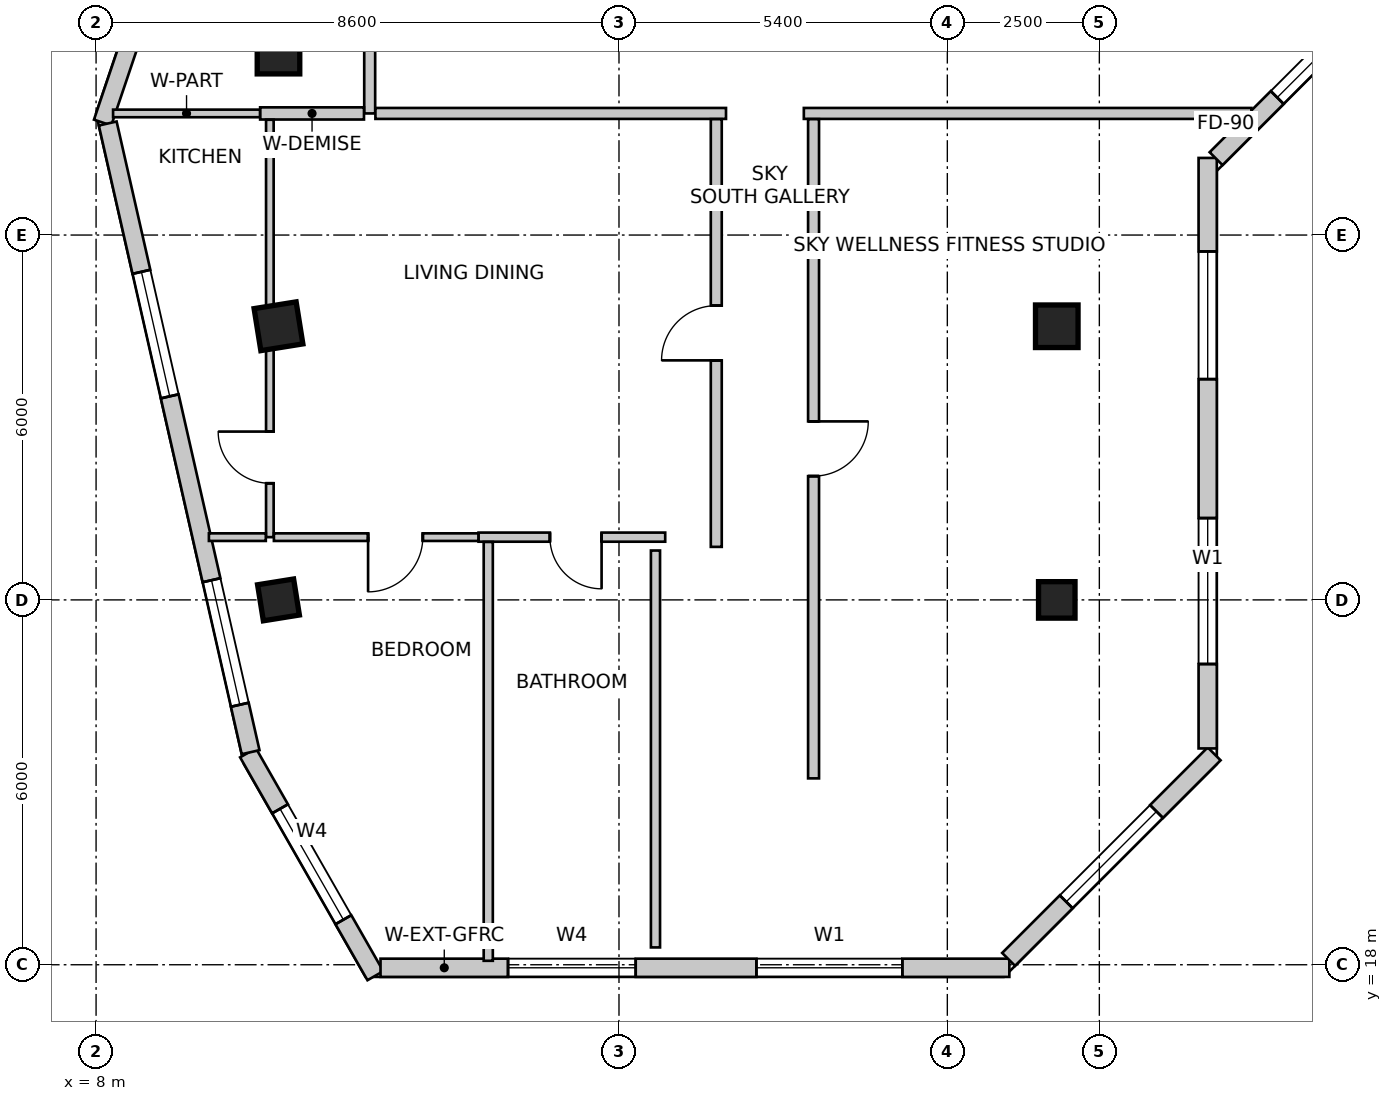
"""IFC4 building model, lengths in metres.
Left out: names, types, materials, properties, quantities, classifications, styles, units other than length and angle.
Written with IfcOpenShell. Run it as: python <this file> out.ifc"""

import sys

from ifc_helpers import new_model, si_unit, direction, frame, frame_2d, origin, origin_2d, place, context, subcontext, project, spatial, rectangle, extrude, source, transform, mapped, element, fill, save


model = new_model("IFC4")
c1 = context("Model", 3, precision=1e-05, world=origin(), true_north=direction((0.0, 1.0)))
c2 = subcontext(c1, "Body", "Model", "MODEL_VIEW")
j1 = project(units=[si_unit("LENGTHUNIT", "METRE"), si_unit("PLANEANGLEUNIT", "RADIAN")], contexts=[c1])
p1 = place(None, origin())
s1 = spatial("IfcSite", under=j1, at=p1, CompositionType="ELEMENT")
p2 = place(p1, origin())
s2 = spatial("IfcBuilding", under=s1, at=p2, CompositionType="ELEMENT")
p3 = place(p2, frame((0.0, 0.0, 260.1)))
s3 = spatial("IfcBuildingStorey", under=s2, at=p3, CompositionType="ELEMENT", Elevation=260.1)
m1 = source(origin(), c2, "Body", "SweptSolid", [
    extrude(rectangle(XDim=0.7, YDim=0.7, at=origin_2d()), origin(), (0.0, 0.0, 1.0), 3.6),
])
for number, where, z_axis, x_axis in (
    (1, (11.0, 33.0, 0.0), (0.0, 0.0, 1.0), (1.0, 0.0, 0.0)),
    (2, (11.0, 28.5, 0.0), (0.0, 0.0, 1.0), (0.158, -0.987, 0.0)),
):
    element("IfcColumn", number, at=place(p3, frame(where, z_axis=z_axis, x_axis=x_axis)), inside=s3, PredefinedType="COLUMN", context=c2, shape_type="MappedRepresentation", body=[
        mapped(m1, transform((0.0, 0.0, 0.0), scale=1.0)),
    ])
m2 = source(origin(), c2, "Body", "SweptSolid", [
    extrude(rectangle(XDim=0.6, YDim=0.6, at=origin_2d()), origin(), (0.0, 0.0, 1.0), 3.6),
])
p4 = place(p3, frame((11.0, 24.0, 0.0), z_axis=(0.0, 0.0, 1.0), x_axis=(0.158158067254, -0.987413806751, 0.0)))
e3 = element("IfcColumn", 3, at=p4, inside=s3, PredefinedType="COLUMN", context=c2, shape_type="MappedRepresentation", body=[
    mapped(m2, transform((0.0, 0.0, 0.0), scale=1.0)),
])
p5 = place(p3, frame((23.8, 28.5, 0.0), z_axis=(0.0, 0.0, 1.0), x_axis=(1.0, 0.0, 0.0)))
e4 = element("IfcColumn", 4, at=p5, inside=s3, PredefinedType="COLUMN", context=c2, shape_type="MappedRepresentation", body=[
    mapped(m1, transform((0.0, 0.0, 0.0), scale=1.0)),
])
p6 = place(p3, frame((23.8, 24.0, 0.0), z_axis=(0.0, 0.0, 1.0), x_axis=(1.0, 0.0, 0.0)))
e5 = element("IfcColumn", 5, at=p6, inside=s3, PredefinedType="COLUMN", context=c2, shape_type="MappedRepresentation", body=[
    mapped(m2, transform((0.0, 0.0, 0.0), scale=1.0)),
])
p7 = place(p3, frame((10.499, 21.485, 0.0), z_axis=(0.0, 0.0, 1.0), x_axis=(0.496163848656, -0.868228907194, 0.0)))
e6 = element("IfcWall", 6, at=p7, inside=s3, PredefinedType="SOLIDWALL", context=c2, shape_type="SweptSolid", body=[
    extrude(rectangle(XDim=4.222, YDim=0.3, at=frame_2d((2.111, 0.0))), origin(), (0.0, 0.0, 1.0), 3.35),
])
m3 = source(origin(), c2, "Body", "SweptSolid", [
    extrude(rectangle(XDim=2.1, YDim=2.0, at=frame_2d((1.05, 1.0))), frame((0.0, 0.16, 0.0), z_axis=(0.0, -1.0, 0.0), x_axis=(1.0, 0.0, 0.0)), (0.0, 0.0, 1.0), 0.32),
])
p8 = place(p7, frame((1.061, 0.0, 0.85)))
e7 = element("IfcOpeningElement", 7, at=p8, cuts=e6, PredefinedType="OPENING", context=c2, shape_type="MappedRepresentation", body=[
    mapped(m3, transform((0.0, 0.0, 0.0), scale=1.0)),
])
p9 = place(p3, frame((12.678, 17.95, 0.0), z_axis=(0.0, 0.0, 1.0), x_axis=(1.0, 0.0, 0.0)))
e8 = element("IfcWall", 8, at=p9, inside=s3, PredefinedType="SOLIDWALL", context=c2, shape_type="SweptSolid", body=[
    extrude(rectangle(XDim=10.342, YDim=0.3, at=frame_2d((5.171, 0.0))), origin(), (0.0, 0.0, 1.0), 3.35),
])
p10 = place(p9, frame((2.097, 0.0, 0.85)))
e9 = element("IfcOpeningElement", 9, at=p10, cuts=e8, PredefinedType="OPENING", context=c2, shape_type="MappedRepresentation", body=[
    mapped(m3, transform((0.0, 0.0, 0.0), scale=1.0)),
])
m4 = source(origin(), c2, "Body", "SweptSolid", [
    extrude(rectangle(XDim=2.4, YDim=2.2, at=frame_2d((1.2, 1.1))), frame((0.0, 0.16, 0.0), z_axis=(0.0, -1.0, 0.0), x_axis=(1.0, 0.0, 0.0)), (0.0, 0.0, 1.0), 0.32),
])
p11 = place(p9, frame((6.182, 0.0, 0.85)))
e10 = element("IfcOpeningElement", 10, at=p11, cuts=e8, PredefinedType="OPENING", context=c2, shape_type="MappedRepresentation", body=[
    mapped(m4, transform((0.0, 0.0, 0.0), scale=1.0)),
])
p12 = place(p3, frame((23.008, 18.088, 0.0), z_axis=(0.0, 0.0, 1.0), x_axis=(0.707106781187, 0.707106781187, 0.0)))
e11 = element("IfcWall", 11, at=p12, inside=s3, PredefinedType="SOLIDWALL", context=c2, shape_type="SweptSolid", body=[
    extrude(rectangle(XDim=4.781, YDim=0.3, at=frame_2d((2.39, 0.0))), origin(), (0.0, 0.0, 1.0), 3.35),
])
p13 = place(p12, frame((1.34, 0.0, 0.85)))
e12 = element("IfcOpeningElement", 12, at=p13, cuts=e11, PredefinedType="OPENING", context=c2, shape_type="MappedRepresentation", body=[
    mapped(m3, transform((0.0, 0.0, 0.0), scale=1.0)),
])
p14 = place(p3, frame((26.282, 21.557, 0.0), z_axis=(0.0, 0.0, 1.0), x_axis=(0.0, 1.0, 0.0)))
e13 = element("IfcWall", 13, at=p14, inside=s3, PredefinedType="SOLIDWALL", context=c2, shape_type="SweptSolid", body=[
    extrude(rectangle(XDim=9.711, YDim=0.3, at=frame_2d((4.855, 0.0))), origin(), (0.0, 0.0, 1.0), 3.35),
])
p15 = place(p14, frame((1.388, 0.0, 0.85)))
e14 = element("IfcOpeningElement", 14, at=p15, cuts=e13, PredefinedType="OPENING", context=c2, shape_type="MappedRepresentation", body=[
    mapped(m4, transform((0.0, 0.0, 0.0), scale=1.0)),
])
p16 = place(p14, frame((6.073, 0.0, 0.85)))
e15 = element("IfcOpeningElement", 15, at=p16, cuts=e13, PredefinedType="OPENING", context=c2, shape_type="MappedRepresentation", body=[
    mapped(m3, transform((0.0, 0.0, 0.0), scale=1.0)),
])
p17 = place(p3, frame((26.42, 31.256, 0.0), z_axis=(0.0, 0.0, 1.0), x_axis=(0.707106781187, 0.707106781187, 0.0)))
e16 = element("IfcWall", 16, at=p17, inside=s3, PredefinedType="SOLIDWALL", context=c2, shape_type="SweptSolid", body=[
    extrude(rectangle(XDim=2.907, YDim=0.3, at=frame_2d((1.454, 0.0))), origin(), (0.0, 0.0, 1.0), 3.35),
])
m5 = source(origin(), c2, "Body", "SweptSolid", [
    extrude(rectangle(XDim=0.9, YDim=1.6, at=frame_2d((0.45, 0.8))), frame((0.0, 0.16, 0.0), z_axis=(0.0, -1.0, 0.0), x_axis=(1.0, 0.0, 0.0)), (0.0, 0.0, 1.0), 0.32),
])
p18 = place(p17, frame((1.422, 0.0, 0.85)))
e17 = element("IfcOpeningElement", 17, at=p18, cuts=e16, PredefinedType="OPENING", context=c2, shape_type="MappedRepresentation", body=[
    mapped(m5, transform((0.0, 0.0, 0.0), scale=1.0)),
])
p19 = place(p3, frame((13.269, 47.134, 0.0), z_axis=(0.0, 0.0, 1.0), x_axis=(-0.3199211297, -0.947444178182, 0.0)))
e18 = element("IfcWall", 18, at=p19, inside=s3, PredefinedType="SOLIDWALL", context=c2, shape_type="SweptSolid", body=[
    extrude(rectangle(XDim=16.132, YDim=0.3, at=frame_2d((8.066, 0.0))), origin(), (0.0, 0.0, 1.0), 3.35),
])
p20 = place(p19, frame((2.435, 0.0, 0.85)))
e19 = element("IfcOpeningElement", 19, at=p20, cuts=e18, PredefinedType="OPENING", context=c2, shape_type="MappedRepresentation", body=[
    mapped(m4, transform((0.0, 0.0, 0.0), scale=1.0)),
])
p21 = place(p19, frame((7.417, 0.0, 0.85)))
e20 = element("IfcOpeningElement", 20, at=p21, cuts=e18, PredefinedType="OPENING", context=c2, shape_type="MappedRepresentation", body=[
    mapped(m3, transform((0.0, 0.0, 0.0), scale=1.0)),
])
p22 = place(p19, frame((12.099, 0.0, 0.85)))
e21 = element("IfcOpeningElement", 21, at=p22, cuts=e18, PredefinedType="OPENING", context=c2, shape_type="MappedRepresentation", body=[
    mapped(m4, transform((0.0, 0.0, 0.0), scale=1.0)),
])
p23 = place(p3, frame((8.191, 31.834, 0.0), z_axis=(0.0, 0.0, 1.0), x_axis=(0.221636032737, -0.975129462683, 0.0)))
e22 = element("IfcWall", 22, at=p23, inside=s3, PredefinedType="SOLIDWALL", context=c2, shape_type="SweptSolid", body=[
    extrude(rectangle(XDim=10.602, YDim=0.3, at=frame_2d((5.301, 0.0))), origin(), (0.0, 0.0, 1.0), 3.35),
])
p24 = place(p23, frame((2.501, 0.0, 0.85)))
e23 = element("IfcOpeningElement", 23, at=p24, cuts=e22, PredefinedType="OPENING", context=c2, shape_type="MappedRepresentation", body=[
    mapped(m3, transform((0.0, 0.0, 0.0), scale=1.0)),
])
p25 = place(p23, frame((7.702, 0.0, 0.85)))
e24 = element("IfcOpeningElement", 24, at=p25, cuts=e22, PredefinedType="OPENING", context=c2, shape_type="MappedRepresentation", body=[
    mapped(m3, transform((0.0, 0.0, 0.0), scale=1.0)),
])
p26 = place(p3, frame((12.5, 32.0, 0.0), z_axis=(0.0, 0.0, 1.0), x_axis=(0.0, 1.0, 0.0)))
e25 = element("IfcWall", 25, at=p26, inside=s3, PredefinedType="PARTITIONING", context=c2, shape_type="SweptSolid", body=[
    extrude(rectangle(XDim=1.556, YDim=0.18, at=frame_2d((0.778, 0.0))), origin(), (0.0, 0.0, 1.0), 2.935),
])
p27 = place(p3, frame((18.36, 32.0, 0.0), z_axis=(0.0, 0.0, 1.0), x_axis=(-1.0, 0.0, 0.0)))
e26 = element("IfcWall", 26, at=p27, inside=s3, PredefinedType="PARTITIONING", context=c2, shape_type="SweptSolid", body=[
    extrude(rectangle(XDim=5.766, YDim=0.18, at=frame_2d((2.883, 0.0))), origin(), (0.0, 0.0, 1.0), 2.935),
])
p28 = place(p3, frame((27.001, 32.0, 0.0), z_axis=(0.0, 0.0, 1.0), x_axis=(-1.0, 0.0, 0.0)))
e27 = element("IfcWall", 27, at=p28, inside=s3, PredefinedType="PARTITIONING", context=c2, shape_type="SweptSolid", body=[
    extrude(rectangle(XDim=7.361, YDim=0.18, at=frame_2d((3.681, 0.0))), origin(), (0.0, 0.0, 1.0), 2.935),
])
p29 = place(p3, frame((12.406, 32.0, 0.0), z_axis=(0.0, 0.0, 1.0), x_axis=(-1.0, 0.0, 0.0)))
e28 = element("IfcWall", 28, at=p29, inside=s3, PredefinedType="PARTITIONING", context=c2, shape_type="SweptSolid", body=[
    extrude(rectangle(XDim=1.708, YDim=0.2, at=frame_2d((0.854, 0.0))), origin(), (0.0, 0.0, 1.0), 2.642),
])
p30 = place(p3, frame((10.696, 32.0, 0.0), z_axis=(0.0, 0.0, 1.0), x_axis=(-1.0, 0.0, 0.0)))
e29 = element("IfcWall", 29, at=p30, inside=s3, PredefinedType="PARTITIONING", context=c2, shape_type="SweptSolid", body=[
    extrude(rectangle(XDim=2.416, YDim=0.125, at=frame_2d((1.208, 0.0))), origin(), (0.0, 0.0, 1.0), 3.35),
])
p31 = place(p3, frame((18.2, 24.872, 0.0), z_axis=(0.0, 0.0, 1.0), x_axis=(0.0, 1.0, 0.0)))
e30 = element("IfcWall", 30, at=p31, inside=s3, PredefinedType="PARTITIONING", context=c2, shape_type="SweptSolid", body=[
    extrude(rectangle(XDim=7.034, YDim=0.18, at=frame_2d((3.517, 0.0))), origin(), (0.0, 0.0, 1.0), 2.788),
])
m6 = source(origin(), c2, "Body", "SweptSolid", [
    extrude(rectangle(XDim=0.9, YDim=2.15, at=frame_2d((0.45, 1.075))), frame((0.0, 0.1, 0.0), z_axis=(0.0, -1.0, 0.0), x_axis=(1.0, 0.0, 0.0)), (0.0, 0.0, 1.0), 0.2),
])
p32 = place(p31, frame((3.067, 0.0, 0.0)))
e31 = element("IfcOpeningElement", 31, at=p32, cuts=e30, PredefinedType="OPENING", context=c2, shape_type="MappedRepresentation", body=[
    mapped(m6, transform((0.0, 0.0, 0.0), scale=1.0)),
])
p33 = place(p3, frame((19.8, 31.906, 0.0), z_axis=(0.0, 0.0, 1.0), x_axis=(0.0, -1.0, 0.0)))
e32 = element("IfcWall", 32, at=p33, inside=s3, PredefinedType="PARTITIONING", context=c2, shape_type="SweptSolid", body=[
    extrude(rectangle(XDim=10.841, YDim=0.18, at=frame_2d((5.42, 0.0))), origin(), (0.0, 0.0, 1.0), 2.788),
])
p34 = place(p33, frame((4.97, 0.0, 0.0)))
e33 = element("IfcOpeningElement", 33, at=p34, cuts=e32, PredefinedType="OPENING", context=c2, shape_type="MappedRepresentation", body=[
    mapped(m6, transform((0.0, 0.0, 0.0), scale=1.0)),
])
p35 = place(p3, frame((10.858, 25.032, 0.0), z_axis=(0.0, 0.0, 1.0), x_axis=(0.0, 1.0, 0.0)))
e34 = element("IfcWall", 34, at=p35, inside=s3, PredefinedType="PARTITIONING", context=c2, shape_type="SweptSolid", body=[
    extrude(rectangle(XDim=6.864, YDim=0.125, at=frame_2d((3.432, 0.0))), origin(), (0.0, 0.0, 1.0), 2.642),
])
m7 = source(origin(), c2, "Body", "SweptSolid", [
    extrude(rectangle(XDim=0.85, YDim=2.15, at=frame_2d((0.425, 1.075))), frame((0.0, 0.073, 0.0), z_axis=(0.0, -1.0, 0.0), x_axis=(1.0, 0.0, 0.0)), (0.0, 0.0, 1.0), 0.145),
])
p36 = place(p35, frame((0.886, 0.0, 0.0)))
e35 = element("IfcOpeningElement", 35, at=p36, cuts=e34, PredefinedType="OPENING", context=c2, shape_type="MappedRepresentation", body=[
    mapped(m7, transform((0.0, 0.0, 0.0), scale=1.0)),
])
p37 = place(p3, frame((17.36, 25.032, 0.0), z_axis=(0.0, 0.0, 1.0), x_axis=(-1.0, 0.0, 0.0)))
e36 = element("IfcWall", 36, at=p37, inside=s3, PredefinedType="PARTITIONING", context=c2, shape_type="SweptSolid", body=[
    extrude(rectangle(XDim=3.07, YDim=0.15, at=frame_2d((1.535, 0.0))), origin(), (0.0, 0.0, 1.0), 2.788),
])
m8 = source(origin(), c2, "Body", "SweptSolid", [
    extrude(rectangle(XDim=0.85, YDim=2.15, at=frame_2d((0.425, 1.075))), frame((0.0, 0.085, 0.0), z_axis=(0.0, -1.0, 0.0), x_axis=(1.0, 0.0, 0.0)), (0.0, 0.0, 1.0), 0.17),
])
p38 = place(p37, frame((1.046, 0.0, 0.0)))
e37 = element("IfcOpeningElement", 37, at=p38, cuts=e36, PredefinedType="OPENING", context=c2, shape_type="MappedRepresentation", body=[
    mapped(m8, transform((0.0, 0.0, 0.0), scale=1.0)),
])
p39 = place(p3, frame((14.288, 25.032, 0.0), z_axis=(0.0, 0.0, 1.0), x_axis=(-1.0, 0.0, 0.0)))
e38 = element("IfcWall", 38, at=p39, inside=s3, PredefinedType="PARTITIONING", context=c2, shape_type="SweptSolid", body=[
    extrude(rectangle(XDim=3.364, YDim=0.125, at=frame_2d((1.682, 0.0))), origin(), (0.0, 0.0, 1.0), 2.642),
])
m9 = source(origin(), c2, "Body", "SweptSolid", [
    extrude(rectangle(XDim=0.9, YDim=2.15, at=frame_2d((0.45, 1.075))), frame((0.0, 0.073, 0.0), z_axis=(0.0, -1.0, 0.0), x_axis=(1.0, 0.0, 0.0)), (0.0, 0.0, 1.0), 0.145),
])
p40 = place(p39, frame((0.915, 0.0, 0.0)))
e39 = element("IfcOpeningElement", 39, at=p40, cuts=e38, PredefinedType="OPENING", context=c2, shape_type="MappedRepresentation", body=[
    mapped(m9, transform((0.0, 0.0, 0.0), scale=1.0)),
])
p41 = place(p3, frame((10.792, 25.032, 0.0), z_axis=(0.0, 0.0, 1.0), x_axis=(-1.0, 0.0, 0.0)))
e40 = element("IfcWall", 40, at=p41, inside=s3, PredefinedType="PARTITIONING", context=c2, shape_type="SweptSolid", body=[
    extrude(rectangle(XDim=0.936, YDim=0.125, at=frame_2d((0.468, 0.0))), origin(), (0.0, 0.0, 1.0), 3.35),
])
p42 = place(p3, frame((14.45, 18.065, 0.0), z_axis=(0.0, 0.0, 1.0), x_axis=(0.0, 1.0, 0.0)))
e41 = element("IfcWall", 41, at=p42, inside=s3, PredefinedType="PARTITIONING", context=c2, shape_type="SweptSolid", body=[
    extrude(rectangle(XDim=6.888, YDim=0.15, at=frame_2d((3.444, 0.0))), origin(), (0.0, 0.0, 1.0), 2.979),
])
p43 = place(p3, frame((17.2, 24.812, 0.0), z_axis=(0.0, 0.0, 1.0), x_axis=(0.0, -1.0, 0.0)))
e42 = element("IfcWall", 42, at=p43, inside=s3, PredefinedType="PARTITIONING", context=c2, shape_type="SweptSolid", body=[
    extrude(rectangle(XDim=6.527, YDim=0.15, at=frame_2d((3.264, 0.0))), origin(), (0.0, 0.0, 1.0), 2.979),
])
m10 = source(origin(), c2, "Body", "SweptSolid", [
    extrude(rectangle(XDim=2.1, YDim=2.0, at=frame_2d((1.05, 1.0))), frame((0.0, -0.015, 0.0), z_axis=(0.0, -1.0, 0.0), x_axis=(1.0, 0.0, 0.0)), (0.0, 0.0, 1.0), 0.06),
])
p44 = place(p8, origin())
e43 = element("IfcWindow", 43, at=p44, inside=s3, PartitioningType="SINGLE_PANEL", PredefinedType="WINDOW", context=c2, shape_type="MappedRepresentation", body=[
    mapped(m10, transform((0.0, 0.0, 0.0), scale=1.0)),
])
fill(e7, e43)
p45 = place(p10, origin())
e44 = element("IfcWindow", 44, at=p45, inside=s3, PartitioningType="SINGLE_PANEL", PredefinedType="WINDOW", context=c2, shape_type="MappedRepresentation", body=[
    mapped(m10, transform((0.0, 0.0, 0.0), scale=1.0)),
])
fill(e9, e44)
m11 = source(origin(), c2, "Body", "SweptSolid", [
    extrude(rectangle(XDim=2.4, YDim=2.2, at=frame_2d((1.2, 1.1))), frame((0.0, -0.015, 0.0), z_axis=(0.0, -1.0, 0.0), x_axis=(1.0, 0.0, 0.0)), (0.0, 0.0, 1.0), 0.06),
])
p46 = place(p11, origin())
e45 = element("IfcWindow", 45, at=p46, inside=s3, PartitioningType="SINGLE_PANEL", PredefinedType="WINDOW", context=c2, shape_type="MappedRepresentation", body=[
    mapped(m11, transform((0.0, 0.0, 0.0), scale=1.0)),
])
fill(e10, e45)
p47 = place(p13, origin())
e46 = element("IfcWindow", 46, at=p47, inside=s3, PartitioningType="SINGLE_PANEL", PredefinedType="WINDOW", context=c2, shape_type="MappedRepresentation", body=[
    mapped(m10, transform((0.0, 0.0, 0.0), scale=1.0)),
])
fill(e12, e46)
p48 = place(p15, origin())
e47 = element("IfcWindow", 47, at=p48, inside=s3, PartitioningType="SINGLE_PANEL", PredefinedType="WINDOW", context=c2, shape_type="MappedRepresentation", body=[
    mapped(m11, transform((0.0, 0.0, 0.0), scale=1.0)),
])
fill(e14, e47)
p49 = place(p16, origin())
e48 = element("IfcWindow", 48, at=p49, inside=s3, PartitioningType="SINGLE_PANEL", PredefinedType="WINDOW", context=c2, shape_type="MappedRepresentation", body=[
    mapped(m10, transform((0.0, 0.0, 0.0), scale=1.0)),
])
fill(e15, e48)
m12 = source(origin(), c2, "Body", "SweptSolid", [
    extrude(rectangle(XDim=0.9, YDim=1.6, at=frame_2d((0.45, 0.8))), frame((0.0, -0.015, 0.0), z_axis=(0.0, -1.0, 0.0), x_axis=(1.0, 0.0, 0.0)), (0.0, 0.0, 1.0), 0.06),
])
p50 = place(p18, origin())
e49 = element("IfcWindow", 49, at=p50, inside=s3, PartitioningType="SINGLE_PANEL", PredefinedType="WINDOW", context=c2, shape_type="MappedRepresentation", body=[
    mapped(m12, transform((0.0, 0.0, 0.0), scale=1.0)),
])
fill(e17, e49)
p51 = place(p24, origin())
e50 = element("IfcWindow", 50, at=p51, inside=s3, PartitioningType="SINGLE_PANEL", PredefinedType="WINDOW", context=c2, shape_type="MappedRepresentation", body=[
    mapped(m10, transform((0.0, 0.0, 0.0), scale=1.0)),
])
fill(e23, e50)
p52 = place(p25, origin())
e51 = element("IfcWindow", 51, at=p52, inside=s3, PartitioningType="SINGLE_PANEL", PredefinedType="WINDOW", context=c2, shape_type="MappedRepresentation", body=[
    mapped(m10, transform((0.0, 0.0, 0.0), scale=1.0)),
])
fill(e24, e51)
m13 = source(origin(), c2, "Body", "SweptSolid", [
    extrude(rectangle(XDim=0.9, YDim=2.15, at=frame_2d((0.45, 1.075))), frame((0.0, 0.025, 0.0), z_axis=(0.0, -1.0, 0.0), x_axis=(1.0, 0.0, 0.0)), (0.0, 0.0, 1.0), 0.05),
])
p53 = place(p32, origin())
e52 = element("IfcDoor", 52, at=p53, inside=s3, OperationType="SINGLE_SWING_LEFT", PredefinedType="DOOR", context=c2, shape_type="MappedRepresentation", body=[
    mapped(m13, transform((0.0, 0.0, 0.0), scale=1.0)),
])
fill(e31, e52)
m14 = source(origin(), c2, "Body", "SweptSolid", [
    extrude(rectangle(XDim=0.85, YDim=2.15, at=frame_2d((0.425, 1.075))), frame((0.0, 0.025, 0.0), z_axis=(0.0, -1.0, 0.0), x_axis=(1.0, 0.0, 0.0)), (0.0, 0.0, 1.0), 0.05),
])
p54 = place(p36, origin())
e53 = element("IfcDoor", 53, at=p54, inside=s3, OperationType="SINGLE_SWING_RIGHT", PredefinedType="DOOR", context=c2, shape_type="MappedRepresentation", body=[
    mapped(m14, transform((0.0, 0.0, 0.0), scale=1.0)),
])
fill(e35, e53)
p55 = place(p38, origin())
e54 = element("IfcDoor", 54, at=p55, inside=s3, OperationType="SINGLE_SWING_LEFT", PredefinedType="DOOR", context=c2, shape_type="MappedRepresentation", body=[
    mapped(m14, transform((0.0, 0.0, 0.0), scale=1.0)),
])
fill(e37, e54)
m15 = source(origin(), c2, "Body", "SweptSolid", [
    extrude(rectangle(XDim=0.9, YDim=2.15, at=frame_2d((0.45, 1.075))), frame((0.0, 0.025, 0.0), z_axis=(0.0, -1.0, 0.0), x_axis=(1.0, 0.0, 0.0)), (0.0, 0.0, 1.0), 0.05),
])
p56 = place(p40, origin())
e55 = element("IfcDoor", 55, at=p56, inside=s3, OperationType="SINGLE_SWING_RIGHT", PredefinedType="DOOR", context=c2, shape_type="MappedRepresentation", body=[
    mapped(m15, transform((0.0, 0.0, 0.0), scale=1.0)),
])
fill(e39, e55)
p57 = place(p34, origin())
e56 = element("IfcDoor", 56, at=p57, inside=s3, OperationType="SINGLE_SWING_LEFT", PredefinedType="DOOR", context=c2, shape_type="MappedRepresentation", body=[
    mapped(m15, transform((0.0, 0.0, 0.0), scale=1.0)),
])
fill(e33, e56)
save(model, sys.argv[1])
